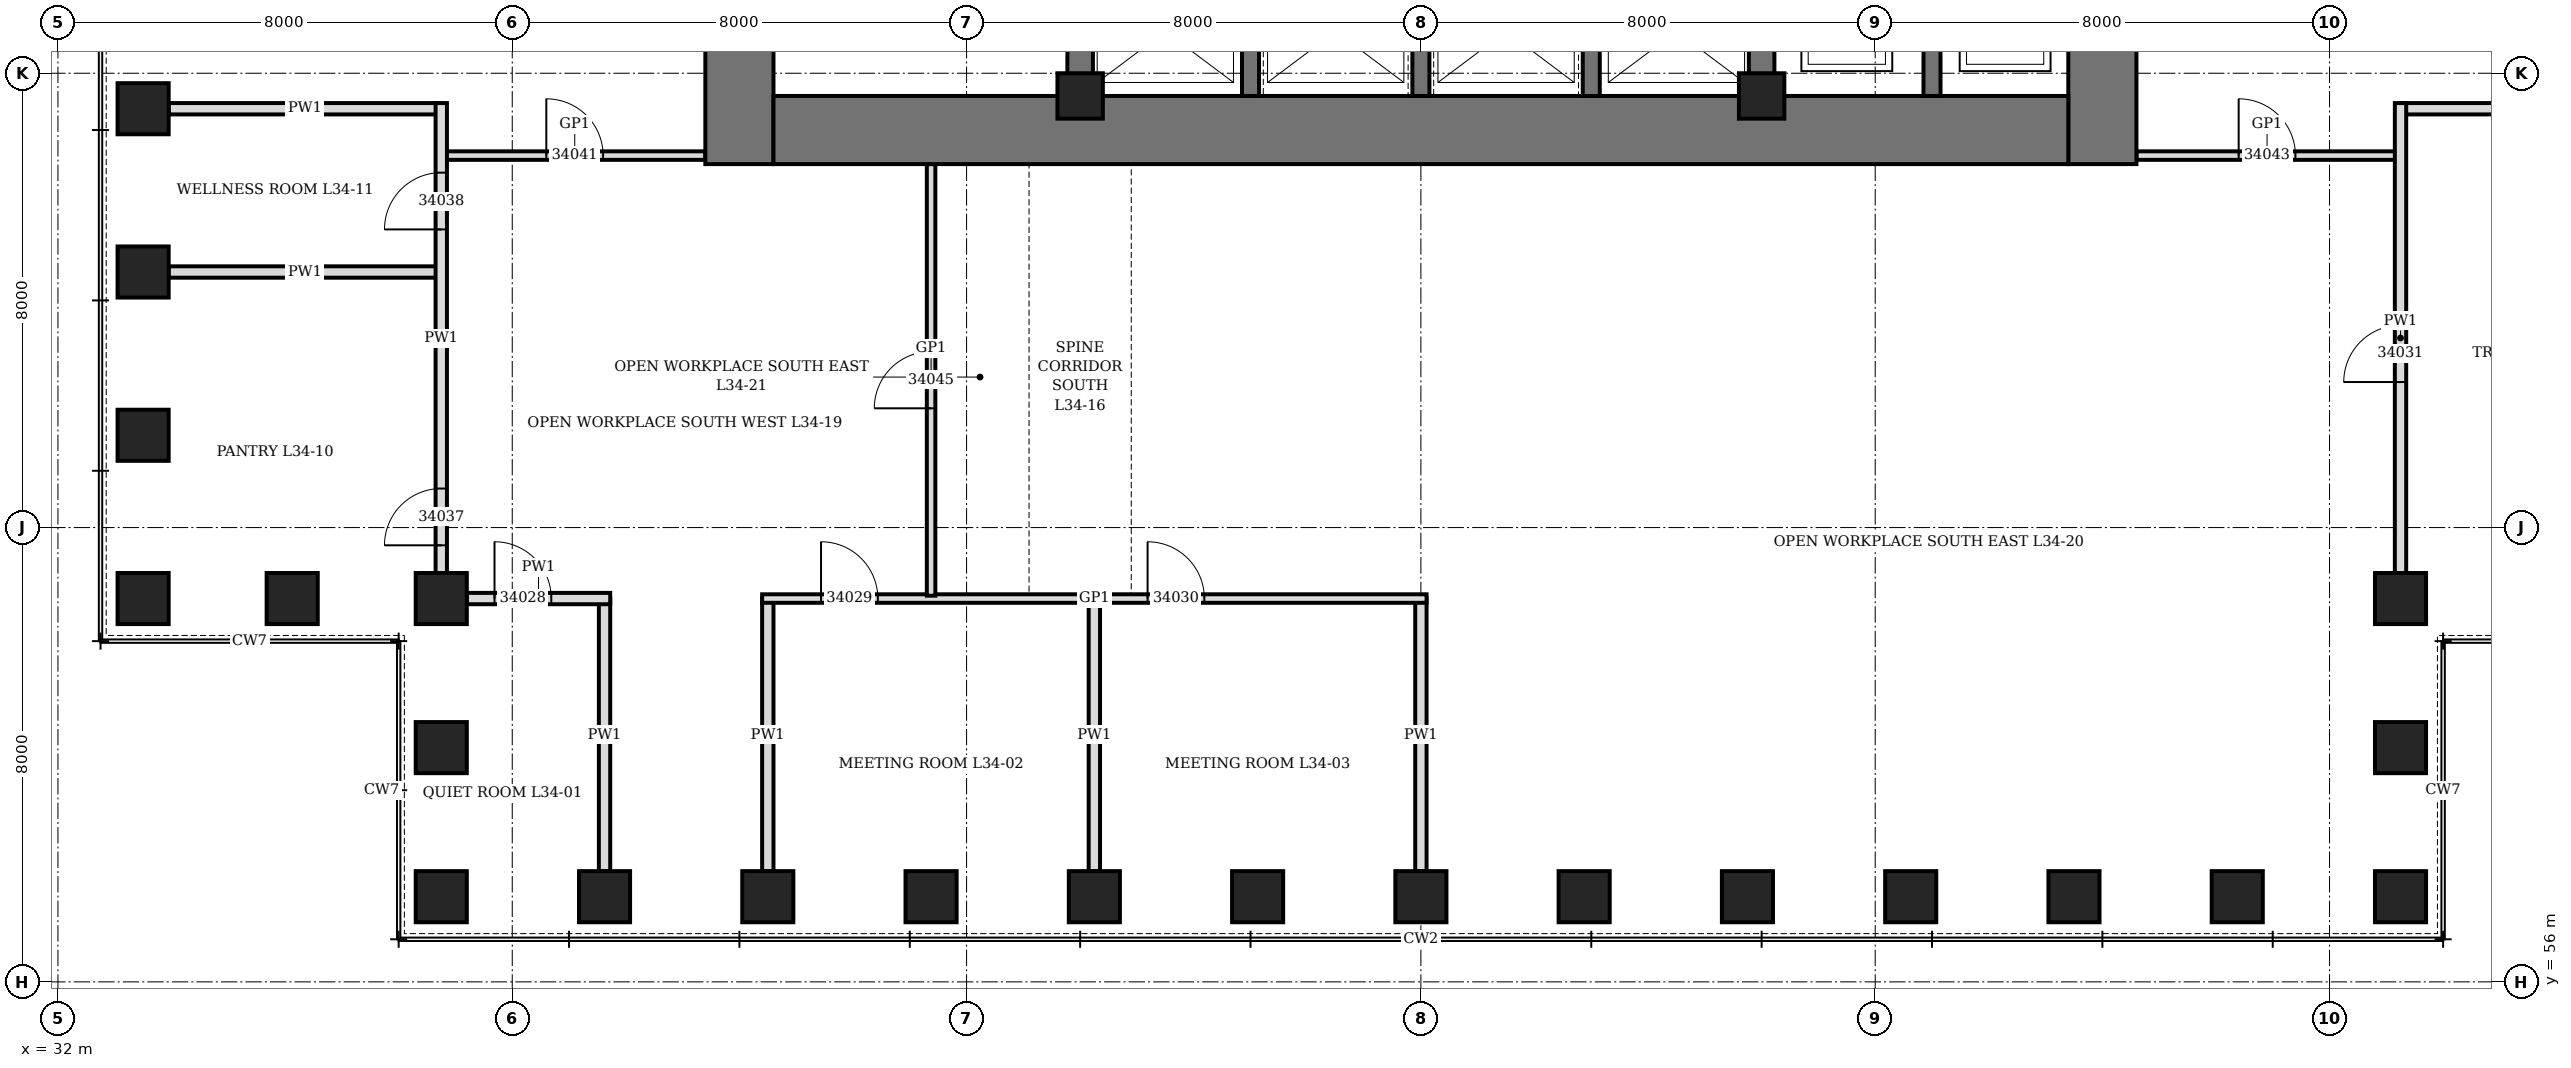
"""IFC4 building model, lengths in metres.
Left out: names, types, materials, properties, quantities, classifications, styles, units other than length and angle.
Written with IfcOpenShell. Run it as: python <this file> out.ifc"""

import sys

from ifc_helpers import new_model, si_unit, direction, frame, frame_2d, origin, origin_2d, place, context, subcontext, project, spatial, rectangle, hollow_rectangle, extrude, element, fill, save


model = new_model("IFC4")
c1 = context("Model", 3, precision=1e-05, world=origin(), true_north=direction((0.0, 1.0)))
c2 = subcontext(c1, "Body", "Model", "MODEL_VIEW")
j1 = project(units=[si_unit("LENGTHUNIT", "METRE"), si_unit("PLANEANGLEUNIT", "RADIAN")], contexts=[c1])
p1 = place(None, origin())
s1 = spatial("IfcSite", under=j1, at=p1, CompositionType="ELEMENT")
p2 = place(p1, origin())
s2 = spatial("IfcBuilding", under=s1, at=p2, CompositionType="ELEMENT")
p3 = place(p2, frame((0.0, 0.0, 154.3)))
s3 = spatial("IfcBuildingStorey", under=s2, at=p3, CompositionType="ELEMENT", Elevation=154.3)
for number, where, z_axis, x_axis in (
    (1, (38.75, 57.5, 0.0), (0.0, 0.0, 1.0), (1.0, 0.0, 0.0)),
    (2, (41.625, 57.5, 0.0), (0.0, 0.0, 1.0), (1.0, 0.0, 0.0)),
    (3, (44.5, 57.5, 0.0), (0.0, 0.0, 1.0), (1.0, 0.0, 0.0)),
    (4, (47.375, 57.5, 0.0), (0.0, 0.0, 1.0), (1.0, 0.0, 0.0)),
    (5, (50.25, 57.5, 0.0), (0.0, 0.0, 1.0), (1.0, 0.0, 0.0)),
    (6, (53.125, 57.5, 0.0), (0.0, 0.0, 1.0), (1.0, 0.0, 0.0)),
    (7, (56.0, 57.5, 0.0), (0.0, 0.0, 1.0), (1.0, 0.0, 0.0)),
    (8, (58.875, 57.5, 0.0), (0.0, 0.0, 1.0), (1.0, 0.0, 0.0)),
    (9, (61.75, 57.5, 0.0), (0.0, 0.0, 1.0), (1.0, 0.0, 0.0)),
    (10, (64.625, 57.5, 0.0), (0.0, 0.0, 1.0), (1.0, 0.0, 0.0)),
    (11, (67.5, 57.5, 0.0), (0.0, 0.0, 1.0), (1.0, 0.0, 0.0)),
    (12, (70.375, 57.5, 0.0), (0.0, 0.0, 1.0), (1.0, 0.0, 0.0)),
    (13, (73.25, 57.5, 0.0), (0.0, 0.0, 1.0), (0.0, 1.0, 0.0)),
    (14, (73.25, 60.125, 0.0), (0.0, 0.0, 1.0), (0.0, 1.0, 0.0)),
    (15, (73.25, 62.75, 0.0), (0.0, 0.0, 1.0), (1.0, 0.0, 0.0)),
    (16, (33.5, 71.375, 0.0), (0.0, 0.0, 1.0), (0.0, 1.0, 0.0)),
    (17, (33.5, 68.5, 0.0), (0.0, 0.0, 1.0), (0.0, 1.0, 0.0)),
    (18, (33.5, 65.625, 0.0), (0.0, 0.0, 1.0), (0.0, 1.0, 0.0)),
    (19, (33.5, 62.75, 0.0), (0.0, 0.0, 1.0), (1.0, 0.0, 0.0)),
    (20, (36.125, 62.75, 0.0), (0.0, 0.0, 1.0), (1.0, 0.0, 0.0)),
    (21, (38.75, 62.75, 0.0), (0.0, 0.0, 1.0), (0.0, 1.0, 0.0)),
    (22, (38.75, 60.125, 0.0), (0.0, 0.0, 1.0), (0.0, 1.0, 0.0)),
):
    element("IfcColumn", number, at=place(p3, frame(where, z_axis=z_axis, x_axis=x_axis)), inside=s3, PredefinedType="COLUMN", context=c2, shape_type="SweptSolid", body=[
        extrude(hollow_rectangle(XDim=0.9, YDim=0.9, WallThickness=0.12, at=origin_2d()), origin(), (0.0, 0.0, 1.0), 4.2),
    ])
p4 = place(p3, frame((44.0, 70.4, 0.0), z_axis=(0.0, 0.0, 1.0), x_axis=(0.0, 1.0, 0.0)))
e23 = element("IfcWall", 23, at=p4, inside=s3, PredefinedType="SHEAR", context=c2, shape_type="SweptSolid", body=[
    extrude(rectangle(XDim=19.2, YDim=1.2, at=frame_2d((9.6, 0.0))), origin(), (0.0, 0.0, 1.0), 4.2),
])
p5 = place(p4, frame((8.6, 0.0, 0.0)))
e24 = element("IfcOpeningElement", 24, at=p5, cuts=e23, PredefinedType="OPENING", context=c2, shape_type="SweptSolid", body=[
    extrude(rectangle(XDim=2.0, YDim=2.4, at=frame_2d((1.0, 1.2))), frame((0.0, 0.61, 0.0), z_axis=(0.0, -1.0, 0.0), x_axis=(1.0, 0.0, 0.0)), (0.0, 0.0, 1.0), 1.22),
])
p6 = place(p3, frame((68.0, 70.4, 0.0), z_axis=(0.0, 0.0, 1.0), x_axis=(0.0, 1.0, 0.0)))
e25 = element("IfcWall", 25, at=p6, inside=s3, PredefinedType="SHEAR", context=c2, shape_type="SweptSolid", body=[
    extrude(rectangle(XDim=19.2, YDim=1.2, at=frame_2d((9.6, 0.0))), origin(), (0.0, 0.0, 1.0), 4.2),
])
p7 = place(p6, frame((8.6, 0.0, 0.0)))
e26 = element("IfcOpeningElement", 26, at=p7, cuts=e25, PredefinedType="OPENING", context=c2, shape_type="SweptSolid", body=[
    extrude(rectangle(XDim=2.0, YDim=2.4, at=frame_2d((1.0, 1.2))), frame((0.0, 0.61, 0.0), z_axis=(0.0, -1.0, 0.0), x_axis=(1.0, 0.0, 0.0)), (0.0, 0.0, 1.0), 1.22),
])
p8 = place(p3, frame((44.6, 71.0, 0.0), z_axis=(0.0, 0.0, 1.0), x_axis=(1.0, 0.0, 0.0)))
e27 = element("IfcWall", 27, at=p8, inside=s3, PredefinedType="SHEAR", context=c2, shape_type="SweptSolid", body=[
    extrude(rectangle(XDim=22.8, YDim=1.2, at=frame_2d((11.4, 0.0))), origin(), (0.0, 0.0, 1.0), 4.2),
])
p9 = place(p3, frame((50.0, 71.6, 0.0), z_axis=(0.0, 0.0, 1.0), x_axis=(0.0, 1.0, 0.0)))
e28 = element("IfcWall", 28, at=p9, inside=s3, PredefinedType="SHEAR", context=c2, shape_type="SweptSolid", body=[
    extrude(rectangle(XDim=16.8, YDim=0.45, at=frame_2d((8.4, 0.0))), origin(), (0.0, 0.0, 1.0), 4.2),
])
p10 = place(p9, frame((7.5, 0.0, 0.0)))
e29 = element("IfcOpeningElement", 29, at=p10, cuts=e28, PredefinedType="OPENING", context=c2, shape_type="SweptSolid", body=[
    extrude(rectangle(XDim=1.8, YDim=2.4, at=frame_2d((0.9, 1.2))), frame((0.0, 0.235, 0.0), z_axis=(0.0, -1.0, 0.0), x_axis=(1.0, 0.0, 0.0)), (0.0, 0.0, 1.0), 0.47),
])
p11 = place(p3, frame((62.0, 71.6, 0.0), z_axis=(0.0, 0.0, 1.0), x_axis=(0.0, 1.0, 0.0)))
e30 = element("IfcWall", 30, at=p11, inside=s3, PredefinedType="SHEAR", context=c2, shape_type="SweptSolid", body=[
    extrude(rectangle(XDim=16.8, YDim=0.45, at=frame_2d((8.4, 0.0))), origin(), (0.0, 0.0, 1.0), 4.2),
])
p12 = place(p11, frame((7.5, 0.0, 0.0)))
e31 = element("IfcOpeningElement", 31, at=p12, cuts=e30, PredefinedType="OPENING", context=c2, shape_type="SweptSolid", body=[
    extrude(rectangle(XDim=1.8, YDim=2.4, at=frame_2d((0.9, 1.2))), frame((0.0, 0.235, 0.0), z_axis=(0.0, -1.0, 0.0), x_axis=(1.0, 0.0, 0.0)), (0.0, 0.0, 1.0), 0.47),
])
for number, where, z_axis, x_axis in (
    (32, (53.0, 71.6, 0.0), (0.0, 0.0, 1.0), (0.0, 1.0, 0.0)),
    (33, (56.0, 71.6, 0.0), (0.0, 0.0, 1.0), (0.0, 1.0, 0.0)),
    (34, (59.0, 71.6, 0.0), (0.0, 0.0, 1.0), (0.0, 1.0, 0.0)),
):
    element("IfcWall", number, at=place(p3, frame(where, z_axis=z_axis, x_axis=x_axis)), inside=s3, PredefinedType="SHEAR", context=c2, shape_type="SweptSolid", body=[
        extrude(rectangle(XDim=2.25, YDim=0.3, at=frame_2d((1.125, 0.0))), origin(), (0.0, 0.0, 1.0), 4.2),
    ])
p13 = place(p3, frame((65.0, 71.6, 0.0), z_axis=(0.0, 0.0, 1.0), x_axis=(0.0, 1.0, 0.0)))
e35 = element("IfcWall", 35, at=p13, inside=s3, PredefinedType="SHEAR", context=c2, shape_type="SweptSolid", body=[
    extrude(rectangle(XDim=3.175, YDim=0.3, at=frame_2d((1.587, 0.0))), origin(), (0.0, 0.0, 1.0), 4.2),
])
for number, where, z_axis, x_axis in (
    (36, (50.0, 71.6, 0.0), (0.0, 0.0, 1.0), (1.0, 0.0, 0.0)),
    (37, (62.0, 71.6, 0.0), (0.0, 0.0, 1.0), (1.0, 0.0, 0.0)),
):
    element("IfcColumn", number, at=place(p3, frame(where, z_axis=z_axis, x_axis=x_axis)), inside=s3, PredefinedType="COLUMN", context=c2, shape_type="SweptSolid", body=[
        extrude(hollow_rectangle(XDim=0.8, YDim=0.8, WallThickness=0.1, at=origin_2d()), origin(), (0.0, 0.0, 1.0), 4.2),
    ])
p14 = place(p3, frame((41.625, 57.95, 0.0), z_axis=(0.0, 0.0, 1.0), x_axis=(0.0, 1.0, 0.0)))
e38 = element("IfcWall", 38, at=p14, inside=s3, PredefinedType="PARTITIONING", context=c2, shape_type="SweptSolid", body=[
    extrude(rectangle(XDim=4.8, YDim=0.2, at=frame_2d((2.4, 0.0))), origin(), (0.0, 0.0, 1.0), 3.428),
])
p15 = place(p3, frame((44.5, 57.95, 0.0), z_axis=(0.0, 0.0, 1.0), x_axis=(0.0, 1.0, 0.0)))
e39 = element("IfcWall", 39, at=p15, inside=s3, PredefinedType="PARTITIONING", context=c2, shape_type="SweptSolid", body=[
    extrude(rectangle(XDim=4.8, YDim=0.2, at=frame_2d((2.4, 0.0))), origin(), (0.0, 0.0, 1.0), 2.74),
])
for number, where, z_axis, x_axis in (
    (40, (50.25, 57.95, 0.0), (0.0, 0.0, 1.0), (0.0, 1.0, 0.0)),
    (41, (56.0, 57.95, 0.0), (0.0, 0.0, 1.0), (0.0, 1.0, 0.0)),
):
    element("IfcWall", number, at=place(p3, frame(where, z_axis=z_axis, x_axis=x_axis)), inside=s3, PredefinedType="PARTITIONING", context=c2, shape_type="SweptSolid", body=[
        extrude(rectangle(XDim=4.8, YDim=0.2, at=frame_2d((2.4, 0.0))), origin(), (0.0, 0.0, 1.0), 3.278),
    ])
for number, where, z_axis, x_axis in (
    (42, (73.25, 71.375, 0.0), (0.0, 0.0, 1.0), (1.0, 0.0, 0.0)),
    (43, (33.95, 68.5, 0.0), (0.0, 0.0, 1.0), (1.0, 0.0, 0.0)),
    (44, (33.95, 71.375, 0.0), (0.0, 0.0, 1.0), (1.0, 0.0, 0.0)),
):
    element("IfcWall", number, at=place(p3, frame(where, z_axis=z_axis, x_axis=x_axis)), inside=s3, PredefinedType="PARTITIONING", context=c2, shape_type="SweptSolid", body=[
        extrude(rectangle(XDim=4.8, YDim=0.2, at=frame_2d((2.4, 0.0))), origin(), (0.0, 0.0, 1.0), 3.428),
    ])
p16 = place(p3, frame((44.4, 62.75, 0.0), z_axis=(0.0, 0.0, 1.0), x_axis=(1.0, 0.0, 0.0)))
e45 = element("IfcWall", 45, at=p16, inside=s3, PredefinedType="PARTITIONING", context=c2, shape_type="SweptSolid", body=[
    extrude(rectangle(XDim=11.7, YDim=0.15, at=frame_2d((5.85, 0.0))), origin(), (0.0, 0.0, 1.0), 4.04),
])
p17 = place(p16, frame((1.038, 0.0, 0.0)))
e46 = element("IfcOpeningElement", 46, at=p17, cuts=e45, PredefinedType="OPENING", context=c2, shape_type="SweptSolid", body=[
    extrude(rectangle(XDim=1.0, YDim=2.4, at=frame_2d((0.5, 1.2))), frame((0.0, 0.085, 0.0), z_axis=(0.0, -1.0, 0.0), x_axis=(1.0, 0.0, 0.0)), (0.0, 0.0, 1.0), 0.17),
])
p18 = place(p16, frame((6.788, 0.0, 0.0)))
e47 = element("IfcOpeningElement", 47, at=p18, cuts=e45, PredefinedType="OPENING", context=c2, shape_type="SweptSolid", body=[
    extrude(rectangle(XDim=1.0, YDim=2.4, at=frame_2d((0.5, 1.2))), frame((0.0, 0.085, 0.0), z_axis=(0.0, -1.0, 0.0), x_axis=(1.0, 0.0, 0.0)), (0.0, 0.0, 1.0), 0.17),
])
p19 = place(p3, frame((39.2, 62.75, 0.0), z_axis=(0.0, 0.0, 1.0), x_axis=(1.0, 0.0, 0.0)))
e48 = element("IfcWall", 48, at=p19, inside=s3, PredefinedType="PARTITIONING", context=c2, shape_type="SweptSolid", body=[
    extrude(rectangle(XDim=2.525, YDim=0.2, at=frame_2d((1.263, 0.0))), origin(), (0.0, 0.0, 1.0), 4.04),
])
p20 = place(p19, frame((0.488, 0.0, 0.0)))
e49 = element("IfcOpeningElement", 49, at=p20, cuts=e48, PredefinedType="OPENING", context=c2, shape_type="SweptSolid", body=[
    extrude(rectangle(XDim=1.0, YDim=2.1, at=frame_2d((0.5, 1.05))), frame((0.0, 0.11, 0.0), z_axis=(0.0, -1.0, 0.0), x_axis=(1.0, 0.0, 0.0)), (0.0, 0.0, 1.0), 0.22),
])
p21 = place(p3, frame((38.8, 70.55, 0.0), z_axis=(0.0, 0.0, 1.0), x_axis=(1.0, 0.0, 0.0)))
e50 = element("IfcWall", 50, at=p21, inside=s3, PredefinedType="PARTITIONING", context=c2, shape_type="SweptSolid", body=[
    extrude(rectangle(XDim=4.6, YDim=0.15, at=frame_2d((2.3, 0.0))), origin(), (0.0, 0.0, 1.0), 4.04),
])
p22 = place(p21, frame((1.8, 0.0, 0.0)))
e51 = element("IfcOpeningElement", 51, at=p22, cuts=e50, PredefinedType="OPENING", context=c2, shape_type="SweptSolid", body=[
    extrude(rectangle(XDim=1.0, YDim=2.4, at=frame_2d((0.5, 1.2))), frame((0.0, 0.085, 0.0), z_axis=(0.0, -1.0, 0.0), x_axis=(1.0, 0.0, 0.0)), (0.0, 0.0, 1.0), 0.17),
])
p23 = place(p3, frame((68.6, 70.55, 0.0), z_axis=(0.0, 0.0, 1.0), x_axis=(1.0, 0.0, 0.0)))
e52 = element("IfcWall", 52, at=p23, inside=s3, PredefinedType="PARTITIONING", context=c2, shape_type="SweptSolid", body=[
    extrude(rectangle(XDim=4.6, YDim=0.15, at=frame_2d((2.3, 0.0))), origin(), (0.0, 0.0, 1.0), 4.04),
])
p24 = place(p23, frame((1.8, 0.0, 0.0)))
e53 = element("IfcOpeningElement", 53, at=p24, cuts=e52, PredefinedType="OPENING", context=c2, shape_type="SweptSolid", body=[
    extrude(rectangle(XDim=1.0, YDim=2.4, at=frame_2d((0.5, 1.2))), frame((0.0, 0.085, 0.0), z_axis=(0.0, -1.0, 0.0), x_axis=(1.0, 0.0, 0.0)), (0.0, 0.0, 1.0), 0.17),
])
p25 = place(p3, frame((38.75, 63.2, 0.0), z_axis=(0.0, 0.0, 1.0), x_axis=(0.0, 1.0, 0.0)))
e54 = element("IfcWall", 54, at=p25, inside=s3, PredefinedType="PARTITIONING", context=c2, shape_type="SweptSolid", body=[
    extrude(rectangle(XDim=8.275, YDim=0.2, at=frame_2d((4.138, 0.0))), origin(), (0.0, 0.0, 1.0), 4.04),
])
p26 = place(p25, frame((0.488, 0.0, 0.0)))
e55 = element("IfcOpeningElement", 55, at=p26, cuts=e54, PredefinedType="OPENING", context=c2, shape_type="SweptSolid", body=[
    extrude(rectangle(XDim=1.0, YDim=2.1, at=frame_2d((0.5, 1.05))), frame((0.0, 0.11, 0.0), z_axis=(0.0, -1.0, 0.0), x_axis=(1.0, 0.0, 0.0)), (0.0, 0.0, 1.0), 0.22),
])
p27 = place(p25, frame((6.05, 0.0, 0.0)))
e56 = element("IfcOpeningElement", 56, at=p27, cuts=e54, PredefinedType="OPENING", context=c2, shape_type="SweptSolid", body=[
    extrude(rectangle(XDim=1.0, YDim=2.1, at=frame_2d((0.5, 1.05))), frame((0.0, 0.11, 0.0), z_axis=(0.0, -1.0, 0.0), x_axis=(1.0, 0.0, 0.0)), (0.0, 0.0, 1.0), 0.22),
])
p28 = place(p3, frame((47.375, 62.8, 0.0), z_axis=(0.0, 0.0, 1.0), x_axis=(0.0, 1.0, 0.0)))
e57 = element("IfcWall", 57, at=p28, inside=s3, PredefinedType="PARTITIONING", context=c2, shape_type="SweptSolid", body=[
    extrude(rectangle(XDim=7.6, YDim=0.15, at=frame_2d((3.8, 0.0))), origin(), (0.0, 0.0, 1.0), 3.278),
])
p29 = place(p28, frame((3.3, 0.0, 0.0)))
e58 = element("IfcOpeningElement", 58, at=p29, cuts=e57, PredefinedType="OPENING", context=c2, shape_type="SweptSolid", body=[
    extrude(rectangle(XDim=1.0, YDim=2.4, at=frame_2d((0.5, 1.2))), frame((0.0, 0.085, 0.0), z_axis=(0.0, -1.0, 0.0), x_axis=(1.0, 0.0, 0.0)), (0.0, 0.0, 1.0), 0.17),
])
p30 = place(p3, frame((73.25, 63.2, 0.0), z_axis=(0.0, 0.0, 1.0), x_axis=(0.0, 1.0, 0.0)))
e59 = element("IfcWall", 59, at=p30, inside=s3, PredefinedType="PARTITIONING", context=c2, shape_type="SweptSolid", body=[
    extrude(rectangle(XDim=8.275, YDim=0.2, at=frame_2d((4.138, 0.0))), origin(), (0.0, 0.0, 1.0), 4.04),
])
p31 = place(p30, frame((3.363, 0.0, 0.0)))
e60 = element("IfcOpeningElement", 60, at=p31, cuts=e59, PredefinedType="OPENING", context=c2, shape_type="SweptSolid", body=[
    extrude(rectangle(XDim=1.0, YDim=2.1, at=frame_2d((0.5, 1.05))), frame((0.0, 0.11, 0.0), z_axis=(0.0, -1.0, 0.0), x_axis=(1.0, 0.0, 0.0)), (0.0, 0.0, 1.0), 0.22),
])
p32 = place(p20, origin())
e61 = element("IfcDoor", 61, at=p32, inside=s3, OperationType="SINGLE_SWING_LEFT", PredefinedType="DOOR", context=c2, shape_type="SweptSolid", body=[
    extrude(rectangle(XDim=1.0, YDim=2.1, at=frame_2d((0.5, 1.05))), frame((0.0, 0.1, 0.0), z_axis=(0.0, -1.0, 0.0), x_axis=(1.0, 0.0, 0.0)), (0.0, 0.0, 1.0), 0.199),
])
fill(e49, e61)
p33 = place(p17, origin())
e62 = element("IfcDoor", 62, at=p33, inside=s3, OperationType="SINGLE_SWING_RIGHT", PredefinedType="DOOR", context=c2, shape_type="SweptSolid", body=[
    extrude(rectangle(XDim=1.0, YDim=2.4, at=frame_2d((0.5, 1.2))), frame((0.0, 0.075, 0.0), z_axis=(0.0, -1.0, 0.0), x_axis=(1.0, 0.0, 0.0)), (0.0, 0.0, 1.0), 0.149),
])
fill(e46, e62)
p34 = place(p18, origin())
e63 = element("IfcDoor", 63, at=p34, inside=s3, OperationType="SINGLE_SWING_RIGHT", PredefinedType="DOOR", context=c2, shape_type="SweptSolid", body=[
    extrude(rectangle(XDim=1.0, YDim=2.4, at=frame_2d((0.5, 1.2))), frame((0.0, 0.075, 0.0), z_axis=(0.0, -1.0, 0.0), x_axis=(1.0, 0.0, 0.0)), (0.0, 0.0, 1.0), 0.149),
])
fill(e47, e63)
p35 = place(p31, origin())
e64 = element("IfcDoor", 64, at=p35, inside=s3, OperationType="SINGLE_SWING_LEFT", PredefinedType="DOOR", context=c2, shape_type="SweptSolid", body=[
    extrude(rectangle(XDim=1.0, YDim=2.1, at=frame_2d((0.5, 1.05))), frame((0.0, 0.1, 0.0), z_axis=(0.0, -1.0, 0.0), x_axis=(1.0, 0.0, 0.0)), (0.0, 0.0, 1.0), 0.199),
])
fill(e60, e64)
p36 = place(p26, origin())
e65 = element("IfcDoor", 65, at=p36, inside=s3, OperationType="SINGLE_SWING_LEFT", PredefinedType="DOOR", context=c2, shape_type="SweptSolid", body=[
    extrude(rectangle(XDim=1.0, YDim=2.1, at=frame_2d((0.5, 1.05))), frame((0.0, 0.1, 0.0), z_axis=(0.0, -1.0, 0.0), x_axis=(1.0, 0.0, 0.0)), (0.0, 0.0, 1.0), 0.199),
])
fill(e55, e65)
p37 = place(p27, origin())
e66 = element("IfcDoor", 66, at=p37, inside=s3, OperationType="SINGLE_SWING_LEFT", PredefinedType="DOOR", context=c2, shape_type="SweptSolid", body=[
    extrude(rectangle(XDim=1.0, YDim=2.1, at=frame_2d((0.5, 1.05))), frame((0.0, 0.1, 0.0), z_axis=(0.0, -1.0, 0.0), x_axis=(1.0, 0.0, 0.0)), (0.0, 0.0, 1.0), 0.199),
])
fill(e56, e66)
p38 = place(p22, origin())
e67 = element("IfcDoor", 67, at=p38, inside=s3, OperationType="SINGLE_SWING_RIGHT", PredefinedType="DOOR", context=c2, shape_type="SweptSolid", body=[
    extrude(rectangle(XDim=1.0, YDim=2.4, at=frame_2d((0.5, 1.2))), frame((0.0, 0.075, 0.0), z_axis=(0.0, -1.0, 0.0), x_axis=(1.0, 0.0, 0.0)), (0.0, 0.0, 1.0), 0.149),
])
fill(e51, e67)
p39 = place(p24, origin())
e68 = element("IfcDoor", 68, at=p39, inside=s3, OperationType="SINGLE_SWING_RIGHT", PredefinedType="DOOR", context=c2, shape_type="SweptSolid", body=[
    extrude(rectangle(XDim=1.0, YDim=2.4, at=frame_2d((0.5, 1.2))), frame((0.0, 0.075, 0.0), z_axis=(0.0, -1.0, 0.0), x_axis=(1.0, 0.0, 0.0)), (0.0, 0.0, 1.0), 0.149),
])
fill(e53, e68)
p40 = place(p29, origin())
e69 = element("IfcDoor", 69, at=p40, inside=s3, OperationType="SINGLE_SWING_RIGHT", PredefinedType="DOOR", context=c2, shape_type="SweptSolid", body=[
    extrude(rectangle(XDim=1.0, YDim=2.4, at=frame_2d((0.5, 1.2))), frame((0.0, 0.075, 0.0), z_axis=(0.0, -1.0, 0.0), x_axis=(1.0, 0.0, 0.0)), (0.0, 0.0, 1.0), 0.149),
])
fill(e58, e69)
save(model, sys.argv[1])
